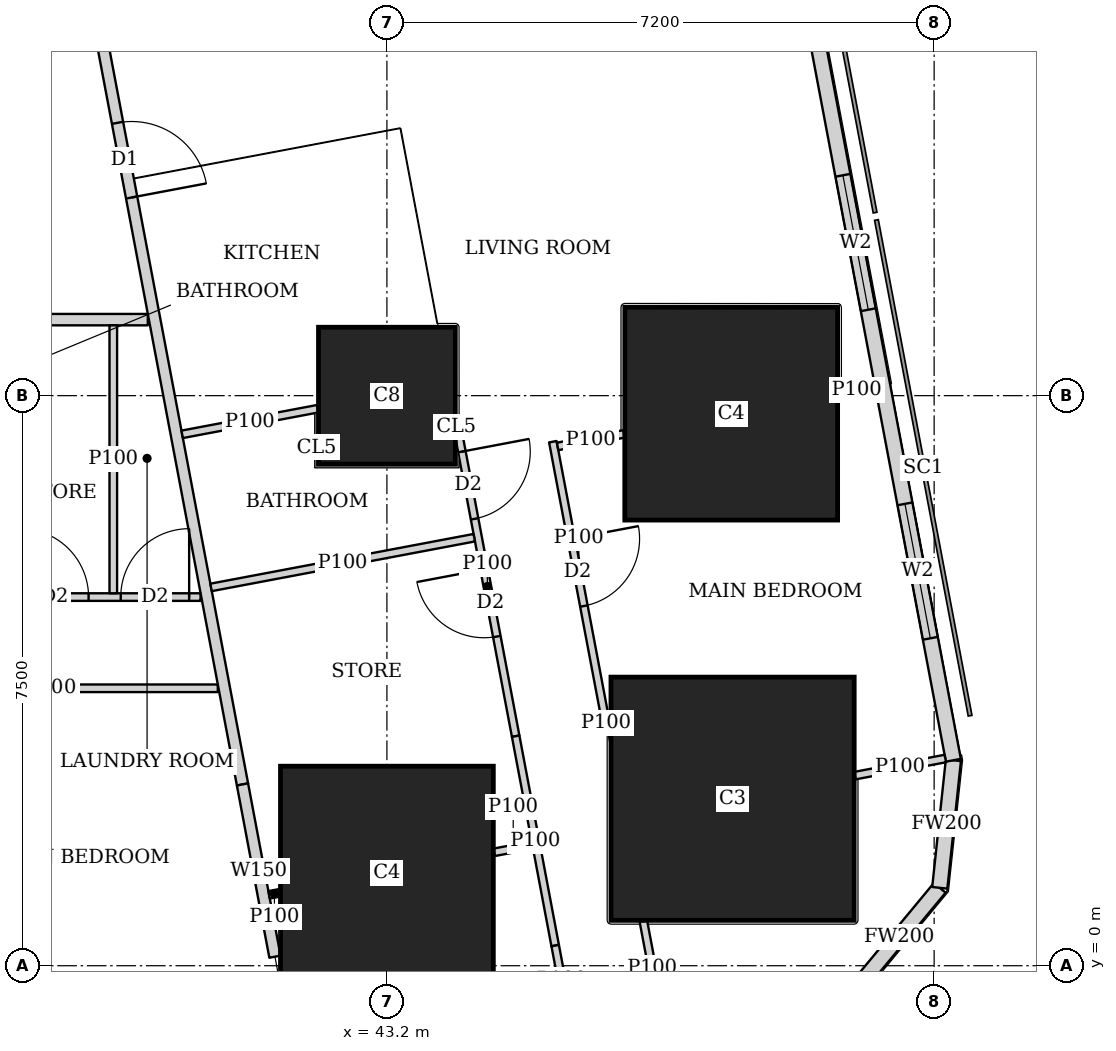
"""IFC4 building model, lengths in metres.
Left out: names, types, materials, properties, quantities, classifications, styles, units other than length and angle.
Written with IfcOpenShell. Run it as: python <this file> out.ifc"""

import sys

from ifc_helpers import new_model, si_unit, direction, frame, frame_2d, origin, origin_2d, place, context, subcontext, project, spatial, rectangle, extrude, element, fill, save


model = new_model("IFC4")
c1 = context("Model", 3, precision=1e-05, world=origin(), true_north=direction((0.0, 1.0)))
c2 = subcontext(c1, "Body", "Model", "MODEL_VIEW")
j1 = project(units=[si_unit("LENGTHUNIT", "METRE"), si_unit("PLANEANGLEUNIT", "RADIAN")], contexts=[c1])
p1 = place(None, origin())
s1 = spatial("IfcSite", under=j1, at=p1, CompositionType="ELEMENT")
p2 = place(p1, origin())
s2 = spatial("IfcBuilding", under=s1, at=p2, CompositionType="ELEMENT")
p3 = place(p2, frame((0.0, 0.0, 68.75)))
s3 = spatial("IfcBuildingStorey", under=s2, at=p3, CompositionType="ELEMENT", Elevation=68.75)
p4 = place(p3, frame((43.2, 1.225, 0.0), z_axis=(0.0, 0.0, 1.0), x_axis=(1.0, 0.0, 0.0)))
e1 = element("IfcColumn", 1, at=p4, inside=s3, PredefinedType="COLUMN", context=c2, shape_type="SweptSolid", body=[
    extrude(rectangle(XDim=2.8, YDim=2.8, at=origin_2d()), origin(), (0.0, 0.0, 1.0), 3.75),
])
p5 = place(p3, frame((47.748, 2.197, 0.0), z_axis=(0.0, 0.0, 1.0), x_axis=(1.0, 0.0, 0.0)))
e2 = element("IfcColumn", 2, at=p5, inside=s3, PredefinedType="COLUMN", context=c2, shape_type="SweptSolid", body=[
    extrude(rectangle(XDim=3.2, YDim=3.2, at=origin_2d()), origin(), (0.0, 0.0, 1.0), 3.75),
])
p6 = place(p3, frame((43.2, 7.5, 0.0), z_axis=(0.0, 0.0, 1.0), x_axis=(1.0, 0.0, 0.0)))
e3 = element("IfcColumn", 3, at=p6, inside=s3, PredefinedType="COLUMN", context=c2, shape_type="SweptSolid", body=[
    extrude(rectangle(XDim=1.8, YDim=1.8, at=origin_2d()), origin(), (0.0, 0.0, 1.0), 3.75),
])
p7 = place(p3, frame((47.73, 7.263, 0.0), z_axis=(0.0, 0.0, 1.0), x_axis=(1.0, 0.0, 0.0)))
e4 = element("IfcColumn", 4, at=p7, inside=s3, PredefinedType="COLUMN", context=c2, shape_type="SweptSolid", body=[
    extrude(rectangle(XDim=2.8, YDim=2.8, at=origin_2d()), origin(), (0.0, 0.0, 1.0), 3.75),
])
p8 = place(p3, frame((49.407, -0.263, 0.0), z_axis=(0.0, 0.0, 1.0), x_axis=(0.638042593423, 0.770001070764, 0.0)))
e5 = element("IfcWall", 5, at=p8, inside=s3, PredefinedType="SOLIDWALL", context=c2, shape_type="SweptSolid", body=[
    extrude(rectangle(XDim=1.673, YDim=0.2, at=frame_2d((0.836, 0.0))), origin(), (0.0, 0.0, 1.0), 3.45),
])
p9 = place(p3, frame((50.474, 1.025, 0.0), z_axis=(0.0, 0.0, 1.0), x_axis=(0.106047815515, 0.994361031429, 0.0)))
e6 = element("IfcWall", 6, at=p9, inside=s3, PredefinedType="SOLIDWALL", context=c2, shape_type="SweptSolid", body=[
    extrude(rectangle(XDim=1.688, YDim=0.2, at=frame_2d((0.844, 0.0))), origin(), (0.0, 0.0, 1.0), 3.45),
])
p10 = place(p3, frame((50.653, 2.703, 0.0), z_axis=(0.0, 0.0, 1.0), x_axis=(-0.185612026696, 0.982623109613, 0.0)))
e7 = element("IfcWall", 7, at=p10, inside=s3, PredefinedType="SOLIDWALL", context=c2, shape_type="SweptSolid", body=[
    extrude(rectangle(XDim=41.393, YDim=0.2, at=frame_2d((20.697, 0.0))), origin(), (0.0, 0.0, 1.0), 3.45),
])
p11 = place(p10, frame((1.633, 0.0, 0.9)))
e8 = element("IfcOpeningElement", 8, at=p11, cuts=e7, PredefinedType="OPENING", context=c2, shape_type="SweptSolid", body=[
    extrude(rectangle(XDim=1.8, YDim=1.5, at=frame_2d((0.9, 0.75))), frame((0.0, 0.11, 0.0), z_axis=(0.0, -1.0, 0.0), x_axis=(1.0, 0.0, 0.0)), (0.0, 0.0, 1.0), 0.22),
])
p12 = place(p10, frame((6.032, 0.0, 0.9)))
e9 = element("IfcOpeningElement", 9, at=p12, cuts=e7, PredefinedType="OPENING", context=c2, shape_type="SweptSolid", body=[
    extrude(rectangle(XDim=1.8, YDim=1.5, at=frame_2d((0.9, 0.75))), frame((0.0, 0.11, 0.0), z_axis=(0.0, -1.0, 0.0), x_axis=(1.0, 0.0, 0.0)), (0.0, 0.0, 1.0), 0.22),
])
p13 = place(p10, frame((9.848, 0.0, 0.9)))
e10 = element("IfcOpeningElement", 10, at=p13, cuts=e7, PredefinedType="OPENING", context=c2, shape_type="SweptSolid", body=[
    extrude(rectangle(XDim=1.8, YDim=1.5, at=frame_2d((0.9, 0.75))), frame((0.0, 0.11, 0.0), z_axis=(0.0, -1.0, 0.0), x_axis=(1.0, 0.0, 0.0)), (0.0, 0.0, 1.0), 0.22),
])
p14 = place(p10, frame((17.481, 0.0, 0.9)))
e11 = element("IfcOpeningElement", 11, at=p14, cuts=e7, PredefinedType="OPENING", context=c2, shape_type="SweptSolid", body=[
    extrude(rectangle(XDim=1.8, YDim=1.5, at=frame_2d((0.9, 0.75))), frame((0.0, 0.11, 0.0), z_axis=(0.0, -1.0, 0.0), x_axis=(1.0, 0.0, 0.0)), (0.0, 0.0, 1.0), 0.22),
])
p15 = place(p10, frame((21.297, 0.0, 0.9)))
e12 = element("IfcOpeningElement", 12, at=p15, cuts=e7, PredefinedType="OPENING", context=c2, shape_type="SweptSolid", body=[
    extrude(rectangle(XDim=1.8, YDim=1.5, at=frame_2d((0.9, 0.75))), frame((0.0, 0.11, 0.0), z_axis=(0.0, -1.0, 0.0), x_axis=(1.0, 0.0, 0.0)), (0.0, 0.0, 1.0), 0.22),
])
p16 = place(p10, frame((25.113, 0.0, 0.9)))
e13 = element("IfcOpeningElement", 13, at=p16, cuts=e7, PredefinedType="OPENING", context=c2, shape_type="SweptSolid", body=[
    extrude(rectangle(XDim=1.8, YDim=1.5, at=frame_2d((0.9, 0.75))), frame((0.0, 0.11, 0.0), z_axis=(0.0, -1.0, 0.0), x_axis=(1.0, 0.0, 0.0)), (0.0, 0.0, 1.0), 0.22),
])
p17 = place(p10, frame((28.93, 0.0, 0.9)))
e14 = element("IfcOpeningElement", 14, at=p17, cuts=e7, PredefinedType="OPENING", context=c2, shape_type="SweptSolid", body=[
    extrude(rectangle(XDim=1.8, YDim=1.5, at=frame_2d((0.9, 0.75))), frame((0.0, 0.11, 0.0), z_axis=(0.0, -1.0, 0.0), x_axis=(1.0, 0.0, 0.0)), (0.0, 0.0, 1.0), 0.22),
])
p18 = place(p10, frame((32.746, 0.0, 0.9)))
e15 = element("IfcOpeningElement", 15, at=p18, cuts=e7, PredefinedType="OPENING", context=c2, shape_type="SweptSolid", body=[
    extrude(rectangle(XDim=1.8, YDim=1.5, at=frame_2d((0.9, 0.75))), frame((0.0, 0.11, 0.0), z_axis=(0.0, -1.0, 0.0), x_axis=(1.0, 0.0, 0.0)), (0.0, 0.0, 1.0), 0.22),
])
p19 = place(p10, frame((36.481, 0.0, 0.9)))
e16 = element("IfcOpeningElement", 16, at=p19, cuts=e7, PredefinedType="OPENING", context=c2, shape_type="SweptSolid", body=[
    extrude(rectangle(XDim=1.8, YDim=1.5, at=frame_2d((0.9, 0.75))), frame((0.0, 0.11, 0.0), z_axis=(0.0, -1.0, 0.0), x_axis=(1.0, 0.0, 0.0)), (0.0, 0.0, 1.0), 0.22),
])
p20 = place(p3, frame((40.054, 8.5, 0.0), z_axis=(0.0, 0.0, 1.0), x_axis=(-1.0, 0.0, 0.0)))
e17 = element("IfcWall", 17, at=p20, inside=s3, PredefinedType="SOLIDWALL", context=c2, shape_type="SweptSolid", body=[
    extrude(rectangle(XDim=31.704, YDim=0.15, at=frame_2d((15.852, 0.0))), origin(), (0.0, 0.0, 1.0), 3.45),
])
p21 = place(p20, frame((28.104, 0.0, 0.0)))
e18 = element("IfcOpeningElement", 18, at=p21, cuts=e17, PredefinedType="OPENING", context=c2, shape_type="SweptSolid", body=[
    extrude(rectangle(XDim=1.0, YDim=2.1, at=frame_2d((0.5, 1.05))), frame((0.0, 0.085, 0.0), z_axis=(0.0, -1.0, 0.0), x_axis=(1.0, 0.0, 0.0)), (0.0, 0.0, 1.0), 0.17),
])
p22 = place(p20, frame((19.755, 0.0, 0.0)))
e19 = element("IfcOpeningElement", 19, at=p22, cuts=e17, PredefinedType="OPENING", context=c2, shape_type="SweptSolid", body=[
    extrude(rectangle(XDim=1.0, YDim=2.1, at=frame_2d((0.5, 1.05))), frame((0.0, 0.085, 0.0), z_axis=(0.0, -1.0, 0.0), x_axis=(1.0, 0.0, 0.0)), (0.0, 0.0, 1.0), 0.17),
])
p23 = place(p20, frame((12.555, 0.0, 0.0)))
e20 = element("IfcOpeningElement", 20, at=p23, cuts=e17, PredefinedType="OPENING", context=c2, shape_type="SweptSolid", body=[
    extrude(rectangle(XDim=1.0, YDim=2.1, at=frame_2d((0.5, 1.05))), frame((0.0, 0.085, 0.0), z_axis=(0.0, -1.0, 0.0), x_axis=(1.0, 0.0, 0.0)), (0.0, 0.0, 1.0), 0.17),
])
p24 = place(p20, frame((5.355, 0.0, 0.0)))
e21 = element("IfcOpeningElement", 21, at=p24, cuts=e17, PredefinedType="OPENING", context=c2, shape_type="SweptSolid", body=[
    extrude(rectangle(XDim=1.0, YDim=2.1, at=frame_2d((0.5, 1.05))), frame((0.0, 0.085, 0.0), z_axis=(0.0, -1.0, 0.0), x_axis=(1.0, 0.0, 0.0)), (0.0, 0.0, 1.0), 0.17),
])
p25 = place(p3, frame((33.68, 42.723, 0.0), z_axis=(0.0, 0.0, 1.0), x_axis=(0.185624129307, -0.98262082342, 0.0)))
e22 = element("IfcWall", 22, at=p25, inside=s3, PredefinedType="SOLIDWALL", context=c2, shape_type="SweptSolid", body=[
    extrude(rectangle(XDim=41.051, YDim=0.15, at=frame_2d((20.526, 0.0))), origin(), (0.0, 0.0, 1.0), 2.45),
])
p26 = place(p25, frame((13.577, 0.0, 0.0)))
e23 = element("IfcOpeningElement", 23, at=p26, cuts=e22, PredefinedType="OPENING", context=c2, shape_type="SweptSolid", body=[
    extrude(rectangle(XDim=1.0, YDim=2.1, at=frame_2d((0.5, 1.05))), frame((0.0, 0.085, 0.0), z_axis=(0.0, -1.0, 0.0), x_axis=(1.0, 0.0, 0.0)), (0.0, 0.0, 1.0), 0.17),
])
p27 = place(p25, frame((17.394, 0.0, 0.0)))
e24 = element("IfcOpeningElement", 24, at=p27, cuts=e22, PredefinedType="OPENING", context=c2, shape_type="SweptSolid", body=[
    extrude(rectangle(XDim=1.0, YDim=2.1, at=frame_2d((0.5, 1.05))), frame((0.0, 0.085, 0.0), z_axis=(0.0, -1.0, 0.0), x_axis=(1.0, 0.0, 0.0)), (0.0, 0.0, 1.0), 0.17),
])
p28 = place(p25, frame((26.758, 0.0, 0.0)))
e25 = element("IfcOpeningElement", 25, at=p28, cuts=e22, PredefinedType="OPENING", context=c2, shape_type="SweptSolid", body=[
    extrude(rectangle(XDim=1.0, YDim=2.1, at=frame_2d((0.5, 1.05))), frame((0.0, 0.085, 0.0), z_axis=(0.0, -1.0, 0.0), x_axis=(1.0, 0.0, 0.0)), (0.0, 0.0, 1.0), 0.17),
])
p29 = place(p25, frame((32.193, 0.0, 0.0)))
e26 = element("IfcOpeningElement", 26, at=p29, cuts=e22, PredefinedType="OPENING", context=c2, shape_type="SweptSolid", body=[
    extrude(rectangle(XDim=1.0, YDim=2.1, at=frame_2d((0.5, 1.05))), frame((0.0, 0.085, 0.0), z_axis=(0.0, -1.0, 0.0), x_axis=(1.0, 0.0, 0.0)), (0.0, 0.0, 1.0), 0.17),
])
p30 = place(p3, frame((41.3, 2.385, 0.0), z_axis=(0.0, 0.0, 1.0), x_axis=(0.185170596553, -0.982706390624, 0.0)))
e27 = element("IfcWall", 27, at=p30, inside=s3, PredefinedType="SOLIDWALL", context=c2, shape_type="SweptSolid", body=[
    extrude(rectangle(XDim=2.306, YDim=0.15, at=frame_2d((1.153, 0.0))), origin(), (0.0, 0.0, 1.0), 2.0),
])
p31 = place(p3, frame((40.975, 3.65, 0.0), z_axis=(0.0, 0.0, 1.0), x_axis=(-1.0, 0.0, 0.0)))
e28 = element("IfcWall", 28, at=p31, inside=s3, PredefinedType="PARTITIONING", context=c2, shape_type="SweptSolid", body=[
    extrude(rectangle(XDim=4.975, YDim=0.1, at=frame_2d((2.488, 0.0))), origin(), (0.0, 0.0, 1.0), 3.45),
])
p32 = place(p31, frame((2.65, 0.0, 0.0)))
e29 = element("IfcOpeningElement", 29, at=p32, cuts=e28, PredefinedType="OPENING", context=c2, shape_type="SweptSolid", body=[
    extrude(rectangle(XDim=0.9, YDim=2.1, at=frame_2d((0.45, 1.05))), frame((0.0, 0.06, 0.0), z_axis=(0.0, -1.0, 0.0), x_axis=(1.0, 0.0, 0.0)), (0.0, 0.0, 1.0), 0.12),
])
p33 = place(p3, frame((40.748, 4.85, 0.0), z_axis=(0.0, 0.0, 1.0), x_axis=(-1.0, 0.0, 0.0)))
e30 = element("IfcWall", 30, at=p33, inside=s3, PredefinedType="PARTITIONING", context=c2, shape_type="SweptSolid", body=[
    extrude(rectangle(XDim=4.748, YDim=0.1, at=frame_2d((2.374, 0.0))), origin(), (0.0, 0.0, 1.0), 3.45),
])
p34 = place(p33, frame((3.273, 0.0, 0.0)))
e31 = element("IfcOpeningElement", 31, at=p34, cuts=e30, PredefinedType="OPENING", context=c2, shape_type="SweptSolid", body=[
    extrude(rectangle(XDim=0.9, YDim=2.1, at=frame_2d((0.45, 1.05))), frame((0.0, 0.06, 0.0), z_axis=(0.0, -1.0, 0.0), x_axis=(1.0, 0.0, 0.0)), (0.0, 0.0, 1.0), 0.12),
])
p35 = place(p33, frame((0.15, 0.0, 0.0)))
e32 = element("IfcOpeningElement", 32, at=p35, cuts=e30, PredefinedType="OPENING", context=c2, shape_type="SweptSolid", body=[
    extrude(rectangle(XDim=0.9, YDim=2.1, at=frame_2d((0.45, 1.05))), frame((0.0, 0.06, 0.0), z_axis=(0.0, -1.0, 0.0), x_axis=(1.0, 0.0, 0.0)), (0.0, 0.0, 1.0), 0.12),
])
p36 = place(p33, frame((1.473, 0.0, 0.0)))
e33 = element("IfcOpeningElement", 33, at=p36, cuts=e30, PredefinedType="OPENING", context=c2, shape_type="SweptSolid", body=[
    extrude(rectangle(XDim=0.9, YDim=2.1, at=frame_2d((0.45, 1.05))), frame((0.0, 0.06, 0.0), z_axis=(0.0, -1.0, 0.0), x_axis=(1.0, 0.0, 0.0)), (0.0, 0.0, 1.0), 0.12),
])
p37 = place(p3, frame((39.6, 4.9, 0.0), z_axis=(0.0, 0.0, 1.0), x_axis=(0.0, 1.0, 0.0)))
e34 = element("IfcWall", 34, at=p37, inside=s3, PredefinedType="PARTITIONING", context=c2, shape_type="SweptSolid", body=[
    extrude(rectangle(XDim=3.525, YDim=0.1, at=frame_2d((1.763, 0.0))), origin(), (0.0, 0.0, 1.0), 3.45),
])
p38 = place(p3, frame((45.383, 6.894, 0.0), z_axis=(0.0, 0.0, 1.0), x_axis=(0.185791461635, -0.982589198385, 0.0)))
e35 = element("IfcWall", 35, at=p38, inside=s3, PredefinedType="PARTITIONING", context=c2, shape_type="SweptSolid", body=[
    extrude(rectangle(XDim=3.687, YDim=0.1, at=frame_2d((1.844, 0.0))), origin(), (0.0, 0.0, 1.0), 3.45),
])
p39 = place(p38, frame((1.3, 0.0, 0.0)))
e36 = element("IfcOpeningElement", 36, at=p39, cuts=e35, PredefinedType="OPENING", context=c2, shape_type="SweptSolid", body=[
    extrude(rectangle(XDim=0.9, YDim=2.1, at=frame_2d((0.45, 1.05))), frame((0.0, 0.06, 0.0), z_axis=(0.0, -1.0, 0.0), x_axis=(1.0, 0.0, 0.0)), (0.0, 0.0, 1.0), 0.12),
])
p40 = place(p3, frame((46.068, 3.271, 0.0), z_axis=(0.0, 0.0, 1.0), x_axis=(0.183590240121, -0.98300286049, 0.0)))
e37 = element("IfcWall", 37, at=p40, inside=s3, PredefinedType="PARTITIONING", context=c2, shape_type="SweptSolid", body=[
    extrude(rectangle(XDim=0.169, YDim=0.1, at=frame_2d((0.084, 0.0))), origin(), (0.0, 0.0, 1.0), 2.0),
])
p41 = place(p3, frame((46.574, 0.587, 0.0), z_axis=(0.0, 0.0, 1.0), x_axis=(0.185997942803, -0.98255013372, 0.0)))
e38 = element("IfcWall", 38, at=p41, inside=s3, PredefinedType="PARTITIONING", context=c2, shape_type="SweptSolid", body=[
    extrude(rectangle(XDim=1.259, YDim=0.1, at=frame_2d((0.629, 0.0))), origin(), (0.0, 0.0, 1.0), 2.0),
])
p42 = place(p3, frame((44.149, 6.96, 0.0), z_axis=(0.0, 0.0, 1.0), x_axis=(0.185824941804, -0.982582867245, 0.0)))
e39 = element("IfcWall", 39, at=p42, inside=s3, PredefinedType="PARTITIONING", context=c2, shape_type="SweptSolid", body=[
    extrude(rectangle(XDim=4.01, YDim=0.1, at=frame_2d((2.005, 0.0))), origin(), (0.0, 0.0, 1.0), 3.45),
])
p43 = place(p42, frame((0.2, 0.0, 0.0)))
e40 = element("IfcOpeningElement", 40, at=p43, cuts=e39, PredefinedType="OPENING", context=c2, shape_type="SweptSolid", body=[
    extrude(rectangle(XDim=0.9, YDim=2.1, at=frame_2d((0.45, 1.05))), frame((0.0, 0.06, 0.0), z_axis=(0.0, -1.0, 0.0), x_axis=(1.0, 0.0, 0.0)), (0.0, 0.0, 1.0), 0.12),
])
p44 = place(p42, frame((1.776, 0.0, 0.0)))
e41 = element("IfcOpeningElement", 41, at=p44, cuts=e39, PredefinedType="OPENING", context=c2, shape_type="SweptSolid", body=[
    extrude(rectangle(XDim=0.9, YDim=2.1, at=frame_2d((0.45, 1.05))), frame((0.0, 0.06, 0.0), z_axis=(0.0, -1.0, 0.0), x_axis=(1.0, 0.0, 0.0)), (0.0, 0.0, 1.0), 0.12),
])
p45 = place(p3, frame((44.894, 3.02, 0.0), z_axis=(0.0, 0.0, 1.0), x_axis=(0.185471317237, -0.982649678412, 0.0)))
e42 = element("IfcWall", 42, at=p45, inside=s3, PredefinedType="PARTITIONING", context=c2, shape_type="SweptSolid", body=[
    extrude(rectangle(XDim=2.804, YDim=0.1, at=frame_2d((1.402, 0.0))), origin(), (0.0, 0.0, 1.0), 2.0),
])
p46 = place(p3, frame((45.414, 0.265, 0.0), z_axis=(0.0, 0.0, 1.0), x_axis=(0.185665855771, -0.982612940074, 0.0)))
e43 = element("IfcWall", 43, at=p46, inside=s3, PredefinedType="PARTITIONING", context=c2, shape_type="SweptSolid", body=[
    extrude(rectangle(XDim=0.931, YDim=0.1, at=frame_2d((0.465, 0.0))), origin(), (0.0, 0.0, 1.0), 3.45),
])
p47 = place(p3, frame((49.622, 7.62, 0.0), z_axis=(0.0, 0.0, 1.0), x_axis=(-0.982629142467, -0.185580086147, 0.0)))
e44 = element("IfcWall", 44, at=p47, inside=s3, PredefinedType="PARTITIONING", context=c2, shape_type="SweptSolid", body=[
    extrude(rectangle(XDim=0.491, YDim=0.1, at=frame_2d((0.245, 0.0))), origin(), (0.0, 0.0, 1.0), 3.45),
])
p48 = place(p3, frame((46.32, 6.997, 0.0), z_axis=(0.0, 0.0, 1.0), x_axis=(-0.982635224332, -0.185547880349, 0.0)))
e45 = element("IfcWall", 45, at=p48, inside=s3, PredefinedType="PARTITIONING", context=c2, shape_type="SweptSolid", body=[
    extrude(rectangle(XDim=0.889, YDim=0.1, at=frame_2d((0.445, 0.0))), origin(), (0.0, 0.0, 1.0), 3.45),
])
p49 = place(p3, frame((50.547, 2.726, 0.0), z_axis=(0.0, 0.0, 1.0), x_axis=(-0.982553313503, -0.185981144539, 0.0)))
e46 = element("IfcWall", 46, at=p49, inside=s3, PredefinedType="PARTITIONING", context=c2, shape_type="SweptSolid", body=[
    extrude(rectangle(XDim=1.21, YDim=0.1, at=frame_2d((0.605, 0.0))), origin(), (0.0, 0.0, 1.0), 3.45),
])
p50 = place(p3, frame((42.29, 7.328, 0.0), z_axis=(0.0, 0.0, 1.0), x_axis=(-0.98262927905, -0.185579362952, 0.0)))
e47 = element("IfcWall", 47, at=p50, inside=s3, PredefinedType="PARTITIONING", context=c2, shape_type="SweptSolid", body=[
    extrude(rectangle(XDim=1.815, YDim=0.1, at=frame_2d((0.908, 0.0))), origin(), (0.0, 0.0, 1.0), 3.45),
])
p51 = place(p3, frame((45.114, 1.587, 0.0), z_axis=(0.0, 0.0, 1.0), x_axis=(-0.982699277433, -0.185208342501, 0.0)))
e48 = element("IfcWall", 48, at=p51, inside=s3, PredefinedType="PARTITIONING", context=c2, shape_type="SweptSolid", body=[
    extrude(rectangle(XDim=0.513, YDim=0.1, at=frame_2d((0.256, 0.0))), origin(), (0.0, 0.0, 1.0), 2.0),
])
p52 = place(p3, frame((41.79, 0.959, 0.0), z_axis=(0.0, 0.0, 1.0), x_axis=(-0.983372768072, -0.181598455428, 0.0)))
e49 = element("IfcWall", 49, at=p52, inside=s3, PredefinedType="PARTITIONING", context=c2, shape_type="SweptSolid", body=[
    extrude(rectangle(XDim=0.143, YDim=0.1, at=frame_2d((0.071, 0.0))), origin(), (0.0, 0.0, 1.0), 2.0),
])
p53 = place(p3, frame((44.349, 5.631, 0.0), z_axis=(0.0, 0.0, 1.0), x_axis=(-0.982629014545, -0.18558076348, 0.0)))
e50 = element("IfcWall", 50, at=p53, inside=s3, PredefinedType="PARTITIONING", context=c2, shape_type="SweptSolid", body=[
    extrude(rectangle(XDim=3.524, YDim=0.1, at=frame_2d((1.762, 0.0))), origin(), (0.0, 0.0, 1.0), 3.45),
])
p54 = place(p11, origin())
e51 = element("IfcWindow", 51, at=p54, inside=s3, PartitioningType="SINGLE_PANEL", PredefinedType="WINDOW", context=c2, shape_type="SweptSolid", body=[
    extrude(rectangle(XDim=1.8, YDim=1.5, at=frame_2d((0.9, 0.75))), frame((0.0, 0.03, 0.0), z_axis=(0.0, -1.0, 0.0), x_axis=(1.0, 0.0, 0.0)), (0.0, 0.0, 1.0), 0.06),
])
fill(e8, e51)
p55 = place(p12, origin())
e52 = element("IfcWindow", 52, at=p55, inside=s3, PartitioningType="SINGLE_PANEL", PredefinedType="WINDOW", context=c2, shape_type="SweptSolid", body=[
    extrude(rectangle(XDim=1.8, YDim=1.5, at=frame_2d((0.9, 0.75))), frame((0.0, 0.03, 0.0), z_axis=(0.0, -1.0, 0.0), x_axis=(1.0, 0.0, 0.0)), (0.0, 0.0, 1.0), 0.06),
])
fill(e9, e52)
p56 = place(p35, origin())
e53 = element("IfcDoor", 53, at=p56, inside=s3, OperationType="SINGLE_SWING_RIGHT", PredefinedType="DOOR", context=c2, shape_type="SweptSolid", body=[
    extrude(rectangle(XDim=0.9, YDim=2.1, at=frame_2d((0.45, 1.05))), frame((0.0, 0.025, 0.0), z_axis=(0.0, -1.0, 0.0), x_axis=(1.0, 0.0, 0.0)), (0.0, 0.0, 1.0), 0.05),
])
fill(e32, e53)
p57 = place(p36, origin())
e54 = element("IfcDoor", 54, at=p57, inside=s3, OperationType="SINGLE_SWING_LEFT", PredefinedType="DOOR", context=c2, shape_type="SweptSolid", body=[
    extrude(rectangle(XDim=0.9, YDim=2.1, at=frame_2d((0.45, 1.05))), frame((0.0, 0.025, 0.0), z_axis=(0.0, -1.0, 0.0), x_axis=(1.0, 0.0, 0.0)), (0.0, 0.0, 1.0), 0.05),
])
fill(e33, e54)
p58 = place(p39, origin())
e55 = element("IfcDoor", 55, at=p58, inside=s3, OperationType="SINGLE_SWING_LEFT", PredefinedType="DOOR", context=c2, shape_type="SweptSolid", body=[
    extrude(rectangle(XDim=0.9, YDim=2.1, at=frame_2d((0.45, 1.05))), frame((0.0, 0.025, 0.0), z_axis=(0.0, -1.0, 0.0), x_axis=(1.0, 0.0, 0.0)), (0.0, 0.0, 1.0), 0.05),
])
fill(e36, e55)
p59 = place(p43, origin())
e56 = element("IfcDoor", 56, at=p59, inside=s3, OperationType="SINGLE_SWING_LEFT", PredefinedType="DOOR", context=c2, shape_type="SweptSolid", body=[
    extrude(rectangle(XDim=0.9, YDim=2.1, at=frame_2d((0.45, 1.05))), frame((0.0, 0.025, 0.0), z_axis=(0.0, -1.0, 0.0), x_axis=(1.0, 0.0, 0.0)), (0.0, 0.0, 1.0), 0.05),
])
fill(e40, e56)
p60 = place(p44, origin())
e57 = element("IfcDoor", 57, at=p60, inside=s3, OperationType="SINGLE_SWING_RIGHT", PredefinedType="DOOR", context=c2, shape_type="SweptSolid", body=[
    extrude(rectangle(XDim=0.9, YDim=2.1, at=frame_2d((0.45, 1.05))), frame((0.0, 0.025, 0.0), z_axis=(0.0, -1.0, 0.0), x_axis=(1.0, 0.0, 0.0)), (0.0, 0.0, 1.0), 0.05),
])
fill(e41, e57)
p61 = place(p29, origin())
e58 = element("IfcDoor", 58, at=p61, inside=s3, OperationType="SINGLE_SWING_RIGHT", PredefinedType="DOOR", context=c2, shape_type="SweptSolid", body=[
    extrude(rectangle(XDim=1.0, YDim=2.1, at=frame_2d((0.5, 1.05))), frame((0.0, 0.025, 0.0), z_axis=(0.0, -1.0, 0.0), x_axis=(1.0, 0.0, 0.0)), (0.0, 0.0, 1.0), 0.05),
])
fill(e26, e58)
save(model, sys.argv[1])
